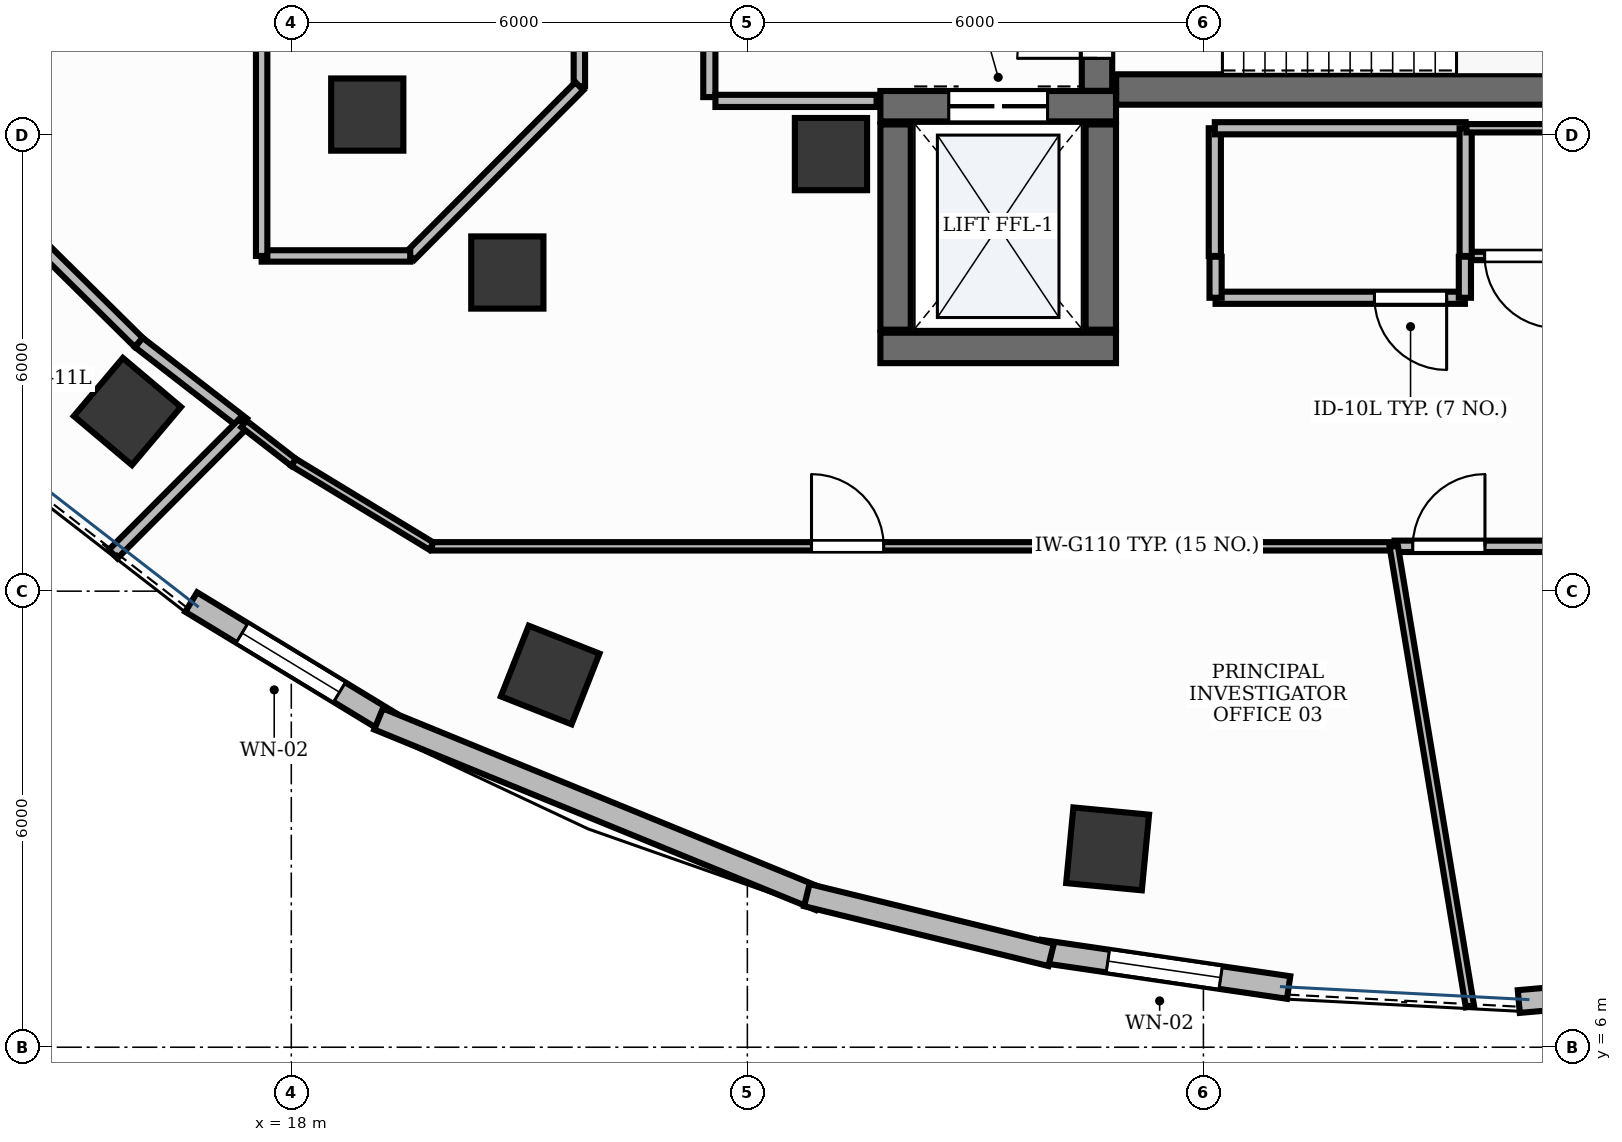
"""IFC4 building model, lengths in metres.
Left out: names, types, materials, properties, quantities, classifications, styles, units other than length and angle.
Written with IfcOpenShell. Run it as: python <this file> out.ifc"""

import sys

from ifc_helpers import new_model, si_unit, direction, frame, frame_2d, origin, origin_2d, place, context, subcontext, project, spatial, rectangle, extrude, element, fill, save


model = new_model("IFC4")
c1 = context("Model", 3, precision=1e-05, world=origin(), true_north=direction((0.0, 1.0)))
c2 = subcontext(c1, "Body", "Model", "MODEL_VIEW")
j1 = project(units=[si_unit("LENGTHUNIT", "METRE"), si_unit("PLANEANGLEUNIT", "RADIAN")], contexts=[c1])
p1 = place(None, origin())
s1 = spatial("IfcSite", under=j1, at=p1, CompositionType="ELEMENT")
p2 = place(p1, origin())
s2 = spatial("IfcBuilding", under=s1, at=p2, CompositionType="ELEMENT")
p3 = place(p2, frame((0.0, 0.0, 183.6)))
s3 = spatial("IfcBuildingStorey", under=s2, at=p3, CompositionType="ELEMENT", Elevation=183.6)
p4 = place(p3, frame((28.852, 18.6, 0.0), z_axis=(0.0, 0.0, 1.0), x_axis=(1.0, 0.0, 0.0)))
e1 = element("IfcWall", 1, at=p4, inside=s3, PredefinedType="SHEAR", context=c2, shape_type="SweptSolid", body=[
    extrude(rectangle(XDim=8.198, YDim=0.4, at=frame_2d((4.099, 0.0))), origin(), (0.0, 0.0, 1.0), 3.9),
])
p5 = place(p3, frame((28.6, 18.582, 0.0), z_axis=(0.0, 0.0, 1.0), x_axis=(0.0, 1.0, 0.0)))
e2 = element("IfcWall", 2, at=p5, inside=s3, PredefinedType="SHEAR", context=c2, shape_type="SweptSolid", body=[
    extrude(rectangle(XDim=3.308, YDim=0.4, at=frame_2d((1.654, 0.0))), origin(), (0.0, 0.0, 1.0), 3.9),
])
p6 = place(p5, frame((0.428, 0.0, 0.0)))
e3 = element("IfcOpeningElement", 3, at=p6, cuts=e2, PredefinedType="OPENING", context=c2, shape_type="SweptSolid", body=[
    extrude(rectangle(XDim=1.05, YDim=2.15, at=frame_2d((0.525, 1.075))), frame((0.0, 0.215, 0.0), z_axis=(0.0, -1.0, 0.0), x_axis=(1.0, 0.0, 0.0)), (0.0, 0.0, 1.0), 0.43),
])
p7 = place(p3, frame((25.75, 15.2, 0.0), z_axis=(0.0, 0.0, 1.0), x_axis=(1.0, 0.0, 0.0)))
e4 = element("IfcWall", 4, at=p7, inside=s3, PredefinedType="SHEAR", context=c2, shape_type="SweptSolid", body=[
    extrude(rectangle(XDim=3.1, YDim=0.4, at=frame_2d((1.55, 0.0))), origin(), (0.0, 0.0, 1.0), 3.9),
])
p8 = place(p3, frame((25.75, 18.38, 0.0), z_axis=(0.0, 0.0, 1.0), x_axis=(1.0, 0.0, 0.0)))
e5 = element("IfcWall", 5, at=p8, inside=s3, PredefinedType="SHEAR", context=c2, shape_type="SweptSolid", body=[
    extrude(rectangle(XDim=3.1, YDim=0.4, at=frame_2d((1.55, 0.0))), origin(), (0.0, 0.0, 1.0), 3.9),
])
p9 = place(p8, frame((0.9, 0.0, 0.0)))
e6 = element("IfcOpeningElement", 6, at=p9, cuts=e5, PredefinedType="OPENING", context=c2, shape_type="SweptSolid", body=[
    extrude(rectangle(XDim=1.3, YDim=2.2, at=frame_2d((0.65, 1.1))), frame((0.0, 0.215, 0.0), z_axis=(0.0, -1.0, 0.0), x_axis=(1.0, 0.0, 0.0)), (0.0, 0.0, 1.0), 0.43),
])
for number, where, z_axis, x_axis in (
    (7, (25.95, 15.44, 0.0), (0.0, 0.0, 1.0), (0.0, 1.0, 0.0)),
    (8, (28.65, 15.44, 0.0), (0.0, 0.0, 1.0), (0.0, 1.0, 0.0)),
):
    element("IfcWall", number, at=place(p3, frame(where, z_axis=z_axis, x_axis=x_axis)), inside=s3, PredefinedType="SHEAR", context=c2, shape_type="SweptSolid", body=[
        extrude(rectangle(XDim=2.7, YDim=0.4, at=frame_2d((1.35, 0.0))), origin(), (0.0, 0.0, 1.0), 3.9),
    ])
p10 = place(p3, frame((25.1, 17.75, -0.0), z_axis=(0.0, 0.0, 1.0), x_axis=(1.0, 0.0, 0.0)))
e9 = element("IfcColumn", 9, at=p10, inside=s3, PredefinedType="PILASTER", context=c2, shape_type="SweptSolid", body=[
    extrude(rectangle(XDim=0.95, YDim=0.95, at=origin_2d()), origin(), (0.0, 0.0, 1.0), 3.901),
])
p11 = place(p3, frame((19.0, 18.27, -0.0), z_axis=(0.0, 0.0, 1.0), x_axis=(1.0, 0.0, 0.0)))
e10 = element("IfcColumn", 10, at=p11, inside=s3, PredefinedType="COLUMN", context=c2, shape_type="SweptSolid", body=[
    extrude(rectangle(XDim=0.95, YDim=0.95, at=origin_2d()), origin(), (0.0, 0.0, 1.0), 3.901),
])
p12 = place(p3, frame((15.844, 14.363, -0.0), z_axis=(0.0, 0.0, 1.0), x_axis=(-0.764246456939, 0.644924300253, 0.0)))
e11 = element("IfcColumn", 11, at=p12, inside=s3, PredefinedType="COLUMN", context=c2, shape_type="SweptSolid", body=[
    extrude(rectangle(XDim=1.0, YDim=1.0, at=origin_2d()), origin(), (0.0, 0.0, 1.0), 3.901),
])
p13 = place(p3, frame((20.842, 16.192, -0.0), z_axis=(0.0, 0.0, 1.0), x_axis=(1.0, 0.0, 0.0)))
e12 = element("IfcColumn", 12, at=p13, inside=s3, PredefinedType="COLUMN", context=c2, shape_type="SweptSolid", body=[
    extrude(rectangle(XDim=0.95, YDim=0.95, at=origin_2d()), origin(), (0.0, 0.0, 1.0), 3.901),
])
for number, where, z_axis, x_axis in (
    (13, (21.406, 10.897, -0.0), (0.0, 0.0, 1.0), (-0.93, 0.367, 0.0)),
    (14, (28.74, 8.61, -0.0), (0.0, 0.0, 1.0), (-0.995, 0.095, 0.0)),
):
    element("IfcColumn", number, at=place(p3, frame(where, z_axis=z_axis, x_axis=x_axis)), inside=s3, PredefinedType="COLUMN", context=c2, shape_type="SweptSolid", body=[
        extrude(rectangle(XDim=1.0, YDim=1.0, at=origin_2d()), origin(), (0.0, 0.0, 1.0), 3.901),
    ])
p14 = place(p3, frame((16.683, 11.856, 0.0), z_axis=(0.0, 0.0, 1.0), x_axis=(0.85455658592, -0.519358297769, 0.0)))
e15 = element("IfcWall", 15, at=p14, inside=s3, PredefinedType="STANDARD", context=c2, shape_type="SweptSolid", body=[
    extrude(rectangle(XDim=3.066, YDim=0.3, at=frame_2d((1.533, 0.0))), origin(), (0.0, 0.0, 1.0), 3.9),
])
p15 = place(p14, frame((0.783, 0.0, 0.95)))
e16 = element("IfcOpeningElement", 16, at=p15, cuts=e15, PredefinedType="OPENING", context=c2, shape_type="SweptSolid", body=[
    extrude(rectangle(XDim=1.5, YDim=1.8, at=frame_2d((0.75, 0.9))), frame((0.0, 0.165, 0.0), z_axis=(0.0, -1.0, 0.0), x_axis=(1.0, 0.0, 0.0)), (0.0, 0.0, 1.0), 0.33),
])
p16 = place(p3, frame((27.849, 7.264, 0.0), z_axis=(0.0, 0.0, 1.0), x_axis=(0.989453322953, -0.144852068321, 0.0)))
e17 = element("IfcWall", 17, at=p16, inside=s3, PredefinedType="STANDARD", context=c2, shape_type="SweptSolid", body=[
    extrude(rectangle(XDim=3.307, YDim=0.3, at=frame_2d((1.653, 0.0))), origin(), (0.0, 0.0, 1.0), 3.9),
])
p17 = place(p16, frame((0.903, 0.0, 0.95)))
e18 = element("IfcOpeningElement", 18, at=p17, cuts=e17, PredefinedType="OPENING", context=c2, shape_type="SweptSolid", body=[
    extrude(rectangle(XDim=1.5, YDim=1.8, at=frame_2d((0.75, 0.9))), frame((0.0, 0.165, 0.0), z_axis=(0.0, -1.0, 0.0), x_axis=(1.0, 0.0, 0.0)), (0.0, 0.0, 1.0), 0.33),
])
p18 = place(p3, frame((19.148, 10.318, 0.0), z_axis=(0.0, 0.0, 1.0), x_axis=(0.925664098805, -0.378346370648, 0.0)))
e19 = element("IfcWall", 19, at=p18, inside=s3, PredefinedType="STANDARD", context=c2, shape_type="SweptSolid", body=[
    extrude(rectangle(XDim=6.272, YDim=0.3, at=frame_2d((3.136, 0.0))), origin(), (0.0, 0.0, 1.0), 3.47),
])
p19 = place(p3, frame((24.782, 8.001, 0.0), z_axis=(0.0, 0.0, 1.0), x_axis=(0.971328615467, -0.237740868963, 0.0)))
e20 = element("IfcWall", 20, at=p19, inside=s3, PredefinedType="STANDARD", context=c2, shape_type="SweptSolid", body=[
    extrude(rectangle(XDim=3.309, YDim=0.3, at=frame_2d((1.654, 0.0))), origin(), (0.0, 0.0, 1.0), 3.9),
])
p20 = place(p3, frame((34.149, 6.601, 0.0), z_axis=(0.0, 0.0, 1.0), x_axis=(0.996255675021, 0.086455942472, 0.0)))
e21 = element("IfcWall", 21, at=p20, inside=s3, PredefinedType="STANDARD", context=c2, shape_type="SweptSolid", body=[
    extrude(rectangle(XDim=6.551, YDim=0.3, at=frame_2d((3.276, 0.0))), origin(), (0.0, 0.0, 1.0), 3.9),
])
p21 = place(p3, frame((23.5, 18.5, 0.0), z_axis=(0.0, 0.0, 1.0), x_axis=(0.0, 1.0, 0.0)))
e22 = element("IfcWall", 22, at=p21, inside=s3, PredefinedType="PARTITIONING", context=c2, shape_type="SweptSolid", body=[
    extrude(rectangle(XDim=3.4, YDim=0.16, at=frame_2d((1.7, 0.0))), origin(), (0.0, 0.0, 1.0), 2.91),
])
p22 = place(p21, frame((1.175, 0.0, 0.0)))
e23 = element("IfcOpeningElement", 23, at=p22, cuts=e22, PredefinedType="OPENING", context=c2, shape_type="SweptSolid", body=[
    extrude(rectangle(XDim=1.05, YDim=2.15, at=frame_2d((0.525, 1.075))), frame((0.0, 0.095, 0.0), z_axis=(0.0, -1.0, 0.0), x_axis=(1.0, 0.0, 0.0)), (0.0, 0.0, 1.0), 0.19),
])
p23 = place(p3, frame((23.58, 18.45, 0.0), z_axis=(0.0, 0.0, 1.0), x_axis=(1.0, 0.0, 0.0)))
e24 = element("IfcWall", 24, at=p23, inside=s3, PredefinedType="PARTITIONING", context=c2, shape_type="SweptSolid", body=[
    extrude(rectangle(XDim=2.12, YDim=0.16, at=frame_2d((1.06, 0.0))), origin(), (0.0, 0.0, 1.0), 2.91),
])
p24 = place(p3, frame((33.44, 15.86, 0.0), z_axis=(0.0, 0.0, 1.0), x_axis=(-1.0, 0.0, 0.0)))
e25 = element("IfcWall", 25, at=p24, inside=s3, PredefinedType="PARTITIONING", context=c2, shape_type="SweptSolid", body=[
    extrude(rectangle(XDim=3.28, YDim=0.16, at=frame_2d((1.64, 0.0))), origin(), (0.0, 0.0, 1.0), 2.91),
])
p25 = place(p24, frame((0.24, 0.0, 0.0)))
e26 = element("IfcOpeningElement", 26, at=p25, cuts=e25, PredefinedType="OPENING", context=c2, shape_type="SweptSolid", body=[
    extrude(rectangle(XDim=0.95, YDim=2.15, at=frame_2d((0.475, 1.075))), frame((0.0, 0.095, 0.0), z_axis=(0.0, -1.0, 0.0), x_axis=(1.0, 0.0, 0.0)), (0.0, 0.0, 1.0), 0.19),
])
p26 = place(p3, frame((19.85, 12.59, 0.0), z_axis=(0.0, 0.0, 1.0), x_axis=(1.0, 0.0, 0.0)))
e27 = element("IfcWall", 27, at=p26, inside=s3, PredefinedType="MOVABLE", context=c2, shape_type="SweptSolid", body=[
    extrude(rectangle(XDim=12.654, YDim=0.11, at=frame_2d((6.327, 0.0))), origin(), (0.0, 0.0, 1.0), 2.91),
])
p27 = place(p26, frame((4.994, 0.0, 0.0)))
e28 = element("IfcOpeningElement", 28, at=p27, cuts=e27, PredefinedType="OPENING", context=c2, shape_type="SweptSolid", body=[
    extrude(rectangle(XDim=0.95, YDim=2.15, at=frame_2d((0.475, 1.075))), frame((0.0, 0.07, 0.0), z_axis=(0.0, -1.0, 0.0), x_axis=(1.0, 0.0, 0.0)), (0.0, 0.0, 1.0), 0.14),
])
p28 = place(p3, frame((32.514, 12.59, 0.0), z_axis=(0.0, 0.0, 1.0), x_axis=(1.0, 0.0, 0.0)))
e29 = element("IfcWall", 29, at=p28, inside=s3, PredefinedType="PARTITIONING", context=c2, shape_type="SweptSolid", body=[
    extrude(rectangle(XDim=11.986, YDim=0.15, at=frame_2d((5.993, 0.0))), origin(), (0.0, 0.0, 1.0), 2.91),
])
p29 = place(p28, frame((0.24, 0.0, 0.0)))
e30 = element("IfcOpeningElement", 30, at=p29, cuts=e29, PredefinedType="OPENING", context=c2, shape_type="SweptSolid", body=[
    extrude(rectangle(XDim=0.95, YDim=2.15, at=frame_2d((0.475, 1.075))), frame((0.0, 0.09, 0.0), z_axis=(0.0, -1.0, 0.0), x_axis=(1.0, 0.0, 0.0)), (0.0, 0.0, 1.0), 0.18),
])
p30 = place(p3, frame((44.5, 16.41, 0.0), z_axis=(0.0, 0.0, 1.0), x_axis=(-1.0, 0.0, 0.0)))
e31 = element("IfcWall", 31, at=p30, inside=s3, PredefinedType="MOVABLE", context=c2, shape_type="SweptSolid", body=[
    extrude(rectangle(XDim=11.04, YDim=0.11, at=frame_2d((5.52, 0.0))), origin(), (0.0, 0.0, 1.0), 2.91),
])
p31 = place(p30, frame((9.85, 0.0, 0.0)))
e32 = element("IfcOpeningElement", 32, at=p31, cuts=e31, PredefinedType="OPENING", context=c2, shape_type="SweptSolid", body=[
    extrude(rectangle(XDim=0.95, YDim=2.15, at=frame_2d((0.475, 1.075))), frame((0.0, 0.07, 0.0), z_axis=(0.0, -1.0, 0.0), x_axis=(1.0, 0.0, 0.0)), (0.0, 0.0, 1.0), 0.14),
])
for number, where, z_axis, x_axis in (
    (33, (33.44, 16.4, 0.0), (0.0, 0.0, 1.0), (0.0, -1.0, 0.0)),
    (34, (30.16, 15.86, 0.0), (0.0, 0.0, 1.0), (0.0, 1.0, 0.0)),
):
    element("IfcWall", number, at=place(p3, frame(where, z_axis=z_axis, x_axis=x_axis)), inside=s3, PredefinedType="PARTITIONING", context=c2, shape_type="SweptSolid", body=[
        extrude(rectangle(XDim=0.54, YDim=0.16, at=frame_2d((0.27, 0.0))), origin(), (0.0, 0.0, 1.0), 2.91),
    ])
p32 = place(p3, frame((30.15, 16.41, 0.0), z_axis=(0.0, 0.0, 1.0), x_axis=(0.0, 1.0, 0.0)))
e35 = element("IfcWall", 35, at=p32, inside=s3, PredefinedType="PARTITIONING", context=c2, shape_type="SweptSolid", body=[
    extrude(rectangle(XDim=1.68, YDim=0.16, at=frame_2d((0.84, 0.0))), origin(), (0.0, 0.0, 1.0), 2.91),
])
p33 = place(p3, frame((30.15, 18.09, 0.0), z_axis=(0.0, 0.0, 1.0), x_axis=(1.0, 0.0, 0.0)))
e36 = element("IfcWall", 36, at=p33, inside=s3, PredefinedType="PARTITIONING", context=c2, shape_type="SweptSolid", body=[
    extrude(rectangle(XDim=3.3, YDim=0.16, at=frame_2d((1.65, 0.0))), origin(), (0.0, 0.0, 1.0), 2.91),
])
p34 = place(p3, frame((33.45, 18.09, 0.0), z_axis=(0.0, 0.0, 1.0), x_axis=(0.0, -1.0, 0.0)))
e37 = element("IfcWall", 37, at=p34, inside=s3, PredefinedType="PARTITIONING", context=c2, shape_type="SweptSolid", body=[
    extrude(rectangle(XDim=1.68, YDim=0.16, at=frame_2d((0.84, 0.0))), origin(), (0.0, 0.0, 1.0), 2.91),
])
p35 = place(p3, frame((14.238, 17.006, 0.0), z_axis=(0.0, 0.0, 1.0), x_axis=(0.711447157113, -0.702739598027, 0.0)))
e38 = element("IfcWall", 38, at=p35, inside=s3, PredefinedType="PARTITIONING", context=c2, shape_type="SweptSolid", body=[
    extrude(rectangle(XDim=2.467, YDim=0.16, at=frame_2d((1.234, 0.0))), origin(), (0.0, 0.0, 1.0), 2.91),
])
p36 = place(p3, frame((15.995, 15.271, 0.0), z_axis=(0.0, 0.0, 1.0), x_axis=(0.790583329936, -0.612354471224, 0.0)))
e39 = element("IfcWall", 39, at=p36, inside=s3, PredefinedType="PARTITIONING", context=c2, shape_type="SweptSolid", body=[
    extrude(rectangle(XDim=1.738, YDim=0.16, at=frame_2d((0.869, 0.0))), origin(), (0.0, 0.0, 1.0), 2.91),
])
p37 = place(p3, frame((17.369, 14.207, 0.0), z_axis=(0.0, 0.0, 1.0), x_axis=(-0.705948871301, -0.708262798056, 0.0)))
e40 = element("IfcWall", 40, at=p37, inside=s3, PredefinedType="PARTITIONING", context=c2, shape_type="SweptSolid", body=[
    extrude(rectangle(XDim=2.427, YDim=0.16, at=frame_2d((1.213, 0.0))), origin(), (0.0, 0.0, 1.0), 2.91),
])
p38 = place(p3, frame((21.79, 20.598, 0.0), z_axis=(0.0, 0.0, 1.0), x_axis=(0.0, -1.0, 0.0)))
e41 = element("IfcWall", 41, at=p38, inside=s3, PredefinedType="PARTITIONING", context=c2, shape_type="SweptSolid", body=[
    extrude(rectangle(XDim=1.955, YDim=0.15, at=frame_2d((0.977, 0.0))), origin(), (0.0, 0.0, 1.0), 2.91),
])
p39 = place(p3, frame((21.79, 18.643, 0.0), z_axis=(0.0, 0.0, 1.0), x_axis=(-0.705866789687, -0.708344602024, 0.0)))
e42 = element("IfcWall", 42, at=p39, inside=s3, PredefinedType="PARTITIONING", context=c2, shape_type="SweptSolid", body=[
    extrude(rectangle(XDim=3.153, YDim=0.15, at=frame_2d((1.577, 0.0))), origin(), (0.0, 0.0, 1.0), 2.91),
])
p40 = place(p3, frame((19.564, 16.41, 0.0), z_axis=(0.0, 0.0, 1.0), x_axis=(-1.0, 0.0, 0.0)))
e43 = element("IfcWall", 43, at=p40, inside=s3, PredefinedType="PARTITIONING", context=c2, shape_type="SweptSolid", body=[
    extrude(rectangle(XDim=1.954, YDim=0.15, at=frame_2d((0.977, 0.0))), origin(), (0.0, 0.0, 1.0), 2.91),
])
p41 = place(p3, frame((17.61, 16.41, 0.0), z_axis=(0.0, 0.0, 1.0), x_axis=(0.0, 1.0, 0.0)))
e44 = element("IfcWall", 44, at=p41, inside=s3, PredefinedType="PARTITIONING", context=c2, shape_type="SweptSolid", body=[
    extrude(rectangle(XDim=4.103, YDim=0.15, at=frame_2d((2.052, 0.0))), origin(), (0.0, 0.0, 1.0), 2.91),
])
p42 = place(p3, frame((17.377, 14.2, 0.0), z_axis=(0.0, 0.0, 1.0), x_axis=(0.790511553124, -0.612447127822, 0.0)))
e45 = element("IfcWall", 45, at=p42, inside=s3, PredefinedType="MOVABLE", context=c2, shape_type="SweptSolid", body=[
    extrude(rectangle(XDim=0.827, YDim=0.11, at=frame_2d((0.413, 0.0))), origin(), (0.0, 0.0, 1.0), 2.91),
])
p43 = place(p3, frame((18.031, 13.694, 0.0), z_axis=(0.0, 0.0, 1.0), x_axis=(0.85454497186, -0.51937740716, 0.0)))
e46 = element("IfcWall", 46, at=p43, inside=s3, PredefinedType="MOVABLE", context=c2, shape_type="SweptSolid", body=[
    extrude(rectangle(XDim=2.122, YDim=0.11, at=frame_2d((1.061, 0.0))), origin(), (0.0, 0.0, 1.0), 2.91),
])
p44 = place(p3, frame((32.504, 12.59, 0.0), z_axis=(0.0, 0.0, 1.0), x_axis=(0.163321963264, -0.986572823625, 0.0)))
e47 = element("IfcWall", 47, at=p44, inside=s3, PredefinedType="MOVABLE", context=c2, shape_type="SweptSolid", body=[
    extrude(rectangle(XDim=6.139, YDim=0.11, at=frame_2d((3.07, 0.0))), origin(), (0.0, 0.0, 1.0), 2.91),
])
p45 = place(p3, frame((33.46, 18.09, 0.0), z_axis=(0.0, 0.0, 1.0), x_axis=(1.0, 0.0, 0.0)))
e48 = element("IfcWall", 48, at=p45, inside=s3, PredefinedType="MOVABLE", context=c2, shape_type="SweptSolid", body=[
    extrude(rectangle(XDim=3.89, YDim=0.11, at=frame_2d((1.945, 0.0))), origin(), (0.0, 0.0, 1.0), 2.91),
])
p46 = place(p15, origin())
e49 = element("IfcWindow", 49, at=p46, inside=s3, PartitioningType="DOUBLE_PANEL_VERTICAL", PredefinedType="WINDOW", context=c2, shape_type="SweptSolid", body=[
    extrude(rectangle(XDim=1.5, YDim=1.8, at=frame_2d((0.75, 0.9))), frame((0.0, 0.03, 0.0), z_axis=(0.0, -1.0, 0.0), x_axis=(1.0, 0.0, 0.0)), (0.0, 0.0, 1.0), 0.06),
])
fill(e16, e49)
p47 = place(p17, origin())
e50 = element("IfcWindow", 50, at=p47, inside=s3, PartitioningType="DOUBLE_PANEL_VERTICAL", PredefinedType="WINDOW", context=c2, shape_type="SweptSolid", body=[
    extrude(rectangle(XDim=1.5, YDim=1.8, at=frame_2d((0.75, 0.9))), frame((0.0, 0.03, 0.0), z_axis=(0.0, -1.0, 0.0), x_axis=(1.0, 0.0, 0.0)), (0.0, 0.0, 1.0), 0.06),
])
fill(e18, e50)
p48 = place(p6, origin())
e51 = element("IfcDoor", 51, at=p48, inside=s3, OperationType="SINGLE_SWING_LEFT", PredefinedType="DOOR", context=c2, shape_type="SweptSolid", body=[
    extrude(rectangle(XDim=1.05, YDim=2.15, at=frame_2d((0.525, 1.075))), frame((0.0, 0.025, 0.0), z_axis=(0.0, -1.0, 0.0), x_axis=(1.0, 0.0, 0.0)), (0.0, 0.0, 1.0), 0.05),
])
fill(e3, e51)
p49 = place(p9, origin())
e52 = element("IfcDoor", 52, at=p49, inside=s3, OperationType="DOUBLE_DOOR_SLIDING", PredefinedType="DOOR", context=c2, shape_type="SweptSolid", body=[
    extrude(rectangle(XDim=1.3, YDim=2.2, at=frame_2d((0.65, 1.1))), frame((0.0, 0.025, 0.0), z_axis=(0.0, -1.0, 0.0), x_axis=(1.0, 0.0, 0.0)), (0.0, 0.0, 1.0), 0.05),
])
fill(e6, e52)
p50 = place(p25, origin())
e53 = element("IfcDoor", 53, at=p50, inside=s3, OperationType="SINGLE_SWING_LEFT", PredefinedType="DOOR", context=c2, shape_type="SweptSolid", body=[
    extrude(rectangle(XDim=0.95, YDim=2.15, at=frame_2d((0.475, 1.075))), frame((0.0, 0.025, 0.0), z_axis=(0.0, -1.0, 0.0), x_axis=(1.0, 0.0, 0.0)), (0.0, 0.0, 1.0), 0.05),
])
fill(e26, e53)
p51 = place(p27, origin())
e54 = element("IfcDoor", 54, at=p51, inside=s3, OperationType="SINGLE_SWING_LEFT", PredefinedType="DOOR", context=c2, shape_type="SweptSolid", body=[
    extrude(rectangle(XDim=0.95, YDim=2.15, at=frame_2d((0.475, 1.075))), frame((0.0, 0.025, 0.0), z_axis=(0.0, -1.0, 0.0), x_axis=(1.0, 0.0, 0.0)), (0.0, 0.0, 1.0), 0.05),
])
fill(e28, e54)
p52 = place(p29, origin())
e55 = element("IfcDoor", 55, at=p52, inside=s3, OperationType="SINGLE_SWING_RIGHT", PredefinedType="DOOR", context=c2, shape_type="SweptSolid", body=[
    extrude(rectangle(XDim=0.95, YDim=2.15, at=frame_2d((0.475, 1.075))), frame((0.0, 0.025, 0.0), z_axis=(0.0, -1.0, 0.0), x_axis=(1.0, 0.0, 0.0)), (0.0, 0.0, 1.0), 0.05),
])
fill(e30, e55)
p53 = place(p31, origin())
e56 = element("IfcDoor", 56, at=p53, inside=s3, OperationType="SINGLE_SWING_LEFT", PredefinedType="DOOR", context=c2, shape_type="SweptSolid", body=[
    extrude(rectangle(XDim=0.95, YDim=2.15, at=frame_2d((0.475, 1.075))), frame((0.0, 0.025, 0.0), z_axis=(0.0, -1.0, 0.0), x_axis=(1.0, 0.0, 0.0)), (0.0, 0.0, 1.0), 0.05),
])
fill(e32, e56)
save(model, sys.argv[1])
